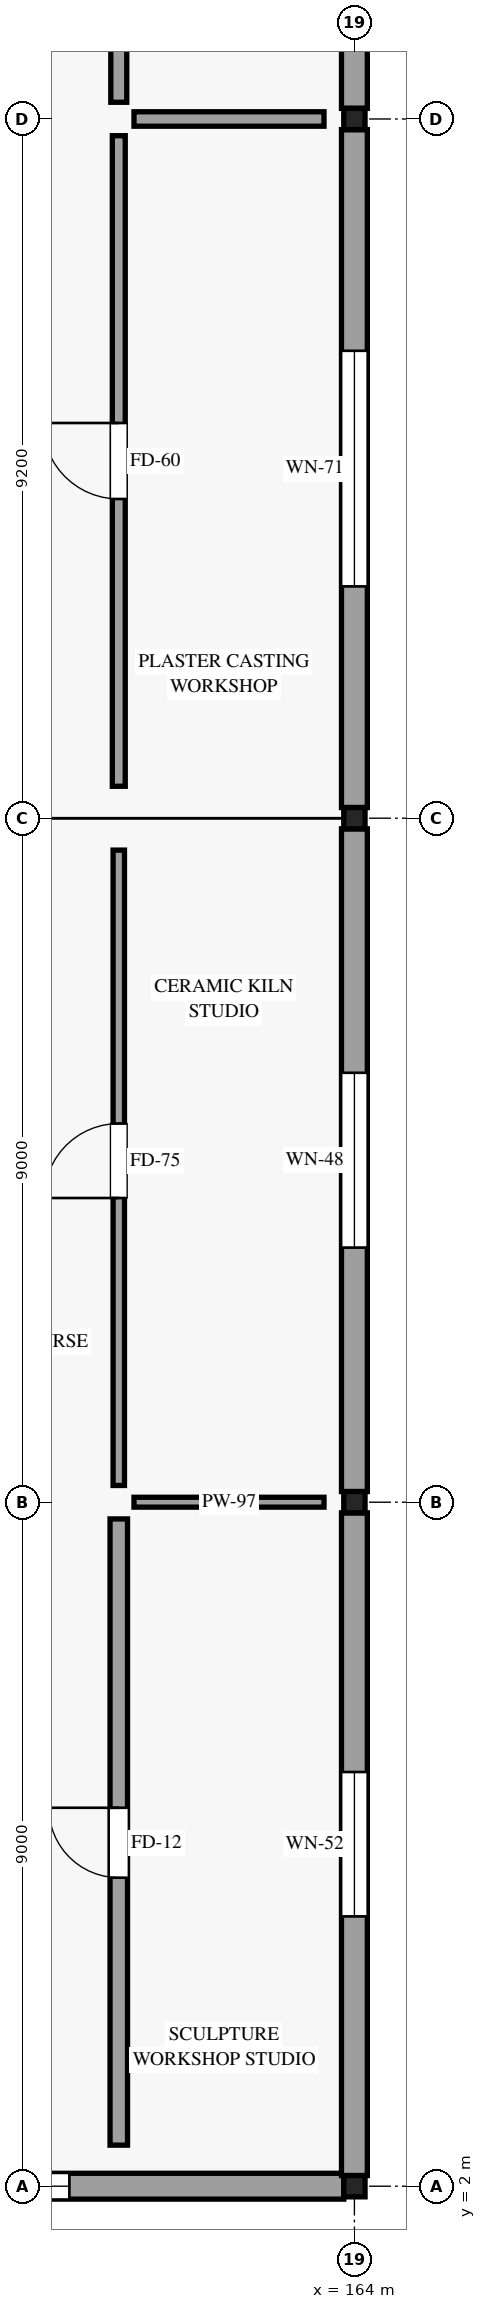
"""IFC4 building model, lengths in metres.
Left out: names, types, materials, properties, quantities, classifications, styles, units other than length and angle.
Written with IfcOpenShell. Run it as: python <this file> out.ifc"""

import sys

from ifc_helpers import new_model, si_unit, direction, frame, frame_2d, origin, origin_2d, place, context, subcontext, project, spatial, rectangle, i_section, extrude, element, fill, save


model = new_model("IFC4")
c1 = context("Model", 3, precision=1e-05, world=origin(), true_north=direction((0.0, 1.0)))
c2 = subcontext(c1, "Body", "Model", "MODEL_VIEW")
j1 = project(units=[si_unit("LENGTHUNIT", "METRE"), si_unit("PLANEANGLEUNIT", "RADIAN")], contexts=[c1])
p1 = place(None, origin())
s1 = spatial("IfcSite", under=j1, at=p1, CompositionType="ELEMENT")
p2 = place(p1, origin())
s2 = spatial("IfcBuilding", under=s1, at=p2, CompositionType="ELEMENT")
p3 = place(p2, frame((0.0, 0.0, 10.2)))
s3 = spatial("IfcBuildingStorey", under=s2, at=p3, CompositionType="ELEMENT", Elevation=10.2)
for number, where, z_axis, x_axis in (
    (1, (164.0, 2.0, 0.0), (0.0, 0.0, 1.0), (1.0, 0.0, 0.0)),
    (2, (164.0, 11.0, 0.0), (0.0, 0.0, 1.0), (1.0, 0.0, 0.0)),
    (3, (164.0, 20.0, 0.0), (0.0, 0.0, 1.0), (1.0, 0.0, 0.0)),
    (4, (164.0, 29.2, 0.0), (0.0, 0.0, 1.0), (1.0, 0.0, 0.0)),
):
    element("IfcColumn", number, at=place(p3, frame(where, z_axis=z_axis, x_axis=x_axis)), inside=s3, PredefinedType="COLUMN", context=c2, shape_type="SweptSolid", body=[
        extrude(i_section(OverallWidth=0.28, OverallDepth=0.28, WebThickness=0.01, FlangeThickness=0.018, FilletRadius=0.024, at=origin_2d()), origin(), (0.0, 0.0, 1.0), 4.8),
    ])
p4 = place(p3, frame((155.14, 2.0, 0.0), z_axis=(0.0, 0.0, 1.0), x_axis=(1.0, 0.0, 0.0)))
e5 = element("IfcWall", 5, at=p4, inside=s3, PredefinedType="STANDARD", context=c2, shape_type="SweptSolid", body=[
    extrude(rectangle(XDim=8.72, YDim=0.34, at=frame_2d((4.36, 0.0))), origin(), (0.0, 0.0, 1.0), 4.115),
])
p5 = place(p4, frame((5.11, 0.0, 0.85), z_axis=(0.0, 0.0, 1.0), x_axis=(-1.0, 0.0, 0.0)))
e6 = element("IfcOpeningElement", 6, at=p5, cuts=e5, PredefinedType="OPENING", context=c2, shape_type="SweptSolid", body=[
    extrude(rectangle(XDim=1.5, YDim=2.2, at=frame_2d((0.75, 1.1))), frame((0.0, 0.18, 0.0), z_axis=(0.0, -1.0, 0.0), x_axis=(1.0, 0.0, 0.0)), (0.0, 0.0, 1.0), 0.36),
])
p6 = place(p3, frame((164.0, 2.14, 0.0), z_axis=(0.0, 0.0, 1.0), x_axis=(0.0, 1.0, 0.0)))
e7 = element("IfcWall", 7, at=p6, inside=s3, PredefinedType="STANDARD", context=c2, shape_type="SweptSolid", body=[
    extrude(rectangle(XDim=8.72, YDim=0.34, at=frame_2d((4.36, 0.0))), origin(), (0.0, 0.0, 1.0), 4.115),
])
p7 = place(p6, frame((5.31, 0.0, 0.85), z_axis=(0.0, 0.0, 1.0), x_axis=(-1.0, 0.0, 0.0)))
e8 = element("IfcOpeningElement", 8, at=p7, cuts=e7, PredefinedType="OPENING", context=c2, shape_type="SweptSolid", body=[
    extrude(rectangle(XDim=1.9, YDim=2.4, at=frame_2d((0.95, 1.2))), frame((0.0, 0.18, 0.0), z_axis=(0.0, -1.0, 0.0), x_axis=(1.0, 0.0, 0.0)), (0.0, 0.0, 1.0), 0.36),
])
p8 = place(p3, frame((164.0, 11.14, 0.0), z_axis=(0.0, 0.0, 1.0), x_axis=(0.0, 1.0, 0.0)))
e9 = element("IfcWall", 9, at=p8, inside=s3, PredefinedType="STANDARD", context=c2, shape_type="SweptSolid", body=[
    extrude(rectangle(XDim=8.72, YDim=0.34, at=frame_2d((4.36, 0.0))), origin(), (0.0, 0.0, 1.0), 4.115),
])
p9 = place(p8, frame((5.51, 0.0, 0.85), z_axis=(0.0, 0.0, 1.0), x_axis=(-1.0, 0.0, 0.0)))
e10 = element("IfcOpeningElement", 10, at=p9, cuts=e9, PredefinedType="OPENING", context=c2, shape_type="SweptSolid", body=[
    extrude(rectangle(XDim=2.3, YDim=2.5, at=frame_2d((1.15, 1.25))), frame((0.0, 0.18, 0.0), z_axis=(0.0, -1.0, 0.0), x_axis=(1.0, 0.0, 0.0)), (0.0, 0.0, 1.0), 0.36),
])
p10 = place(p3, frame((164.0, 20.14, 0.0), z_axis=(0.0, 0.0, 1.0), x_axis=(0.0, 1.0, 0.0)))
e11 = element("IfcWall", 11, at=p10, inside=s3, PredefinedType="STANDARD", context=c2, shape_type="SweptSolid", body=[
    extrude(rectangle(XDim=8.92, YDim=0.34, at=frame_2d((4.46, 0.0))), origin(), (0.0, 0.0, 1.0), 4.115),
])
p11 = place(p10, frame((6.01, 0.0, 0.85), z_axis=(0.0, 0.0, 1.0), x_axis=(-1.0, 0.0, 0.0)))
e12 = element("IfcOpeningElement", 12, at=p11, cuts=e11, PredefinedType="OPENING", context=c2, shape_type="SweptSolid", body=[
    extrude(rectangle(XDim=3.1, YDim=2.3, at=frame_2d((1.55, 1.15))), frame((0.0, 0.18, 0.0), z_axis=(0.0, -1.0, 0.0), x_axis=(1.0, 0.0, 0.0)), (0.0, 0.0, 1.0), 0.36),
])
p12 = place(p3, frame((164.0, 29.34, 0.0), z_axis=(0.0, 0.0, 1.0), x_axis=(0.0, 1.0, 0.0)))
e13 = element("IfcWall", 13, at=p12, inside=s3, PredefinedType="STANDARD", context=c2, shape_type="SweptSolid", body=[
    extrude(rectangle(XDim=8.92, YDim=0.34, at=frame_2d((4.46, 0.0))), origin(), (0.0, 0.0, 1.0), 4.115),
])
p13 = place(p12, frame((5.135, 0.0, 0.85), z_axis=(0.0, 0.0, 1.0), x_axis=(-1.0, 0.0, 0.0)))
e14 = element("IfcOpeningElement", 14, at=p13, cuts=e13, PredefinedType="OPENING", context=c2, shape_type="SweptSolid", body=[
    extrude(rectangle(XDim=1.35, YDim=1.75, at=frame_2d((0.675, 0.875))), frame((0.0, 0.18, 0.0), z_axis=(0.0, -1.0, 0.0), x_axis=(1.0, 0.0, 0.0)), (0.0, 0.0, 1.0), 0.36),
])
p14 = place(p3, frame((160.9, 2.54, 0.0), z_axis=(0.0, 0.0, 1.0), x_axis=(0.0, 1.0, 0.0)))
e15 = element("IfcWall", 15, at=p14, inside=s3, PredefinedType="PARTITIONING", context=c2, shape_type="SweptSolid", body=[
    extrude(rectangle(XDim=8.24, YDim=0.23, at=frame_2d((4.12, 0.0))), origin(), (0.0, 0.0, 1.0), 4.115),
])
p15 = place(p14, frame((3.519, 0.0, 0.0)))
e16 = element("IfcOpeningElement", 16, at=p15, cuts=e15, PredefinedType="OPENING", context=c2, shape_type="SweptSolid", body=[
    extrude(rectangle(XDim=0.92, YDim=2.12, at=frame_2d((0.46, 1.06))), frame((0.0, 0.125, 0.0), z_axis=(0.0, -1.0, 0.0), x_axis=(1.0, 0.0, 0.0)), (0.0, 0.0, 1.0), 0.25),
])
p16 = place(p3, frame((161.1, 11.0, 0.0), z_axis=(0.0, 0.0, 1.0), x_axis=(1.0, 0.0, 0.0)))
e17 = element("IfcWall", 17, at=p16, inside=s3, PredefinedType="PARTITIONING", context=c2, shape_type="SweptSolid", body=[
    extrude(rectangle(XDim=2.5, YDim=0.13, at=frame_2d((1.25, 0.0))), origin(), (0.0, 0.0, 1.0), 4.115),
])
p17 = place(p3, frame((160.9, 11.22, 0.0), z_axis=(0.0, 0.0, 1.0), x_axis=(0.0, 1.0, 0.0)))
e18 = element("IfcWall", 18, at=p17, inside=s3, PredefinedType="PARTITIONING", context=c2, shape_type="SweptSolid", body=[
    extrude(rectangle(XDim=8.36, YDim=0.15, at=frame_2d((4.18, 0.0))), origin(), (0.0, 0.0, 1.0), 4.115),
])
p18 = place(p17, frame((3.782, 0.0, 0.0)))
e19 = element("IfcOpeningElement", 19, at=p18, cuts=e18, PredefinedType="OPENING", context=c2, shape_type="SweptSolid", body=[
    extrude(rectangle(XDim=0.98, YDim=2.18, at=frame_2d((0.49, 1.09))), frame((0.0, 0.085, 0.0), z_axis=(0.0, -1.0, 0.0), x_axis=(1.0, 0.0, 0.0)), (0.0, 0.0, 1.0), 0.17),
])
p19 = place(p3, frame((160.9, 20.42, 0.0), z_axis=(0.0, 0.0, 1.0), x_axis=(0.0, 1.0, 0.0)))
e20 = element("IfcWall", 20, at=p19, inside=s3, PredefinedType="PARTITIONING", context=c2, shape_type="SweptSolid", body=[
    extrude(rectangle(XDim=8.56, YDim=0.17, at=frame_2d((4.28, 0.0))), origin(), (0.0, 0.0, 1.0), 4.115),
])
p20 = place(p19, frame((3.78, 0.0, 0.0)))
e21 = element("IfcOpeningElement", 21, at=p20, cuts=e20, PredefinedType="OPENING", context=c2, shape_type="SweptSolid", body=[
    extrude(rectangle(XDim=1.0, YDim=2.2, at=frame_2d((0.5, 1.1))), frame((0.0, 0.095, 0.0), z_axis=(0.0, -1.0, 0.0), x_axis=(1.0, 0.0, 0.0)), (0.0, 0.0, 1.0), 0.19),
])
p21 = place(p3, frame((161.1, 29.2, 0.0), z_axis=(0.0, 0.0, 1.0), x_axis=(1.0, 0.0, 0.0)))
e22 = element("IfcWall", 22, at=p21, inside=s3, PredefinedType="PARTITIONING", context=c2, shape_type="SweptSolid", body=[
    extrude(rectangle(XDim=2.5, YDim=0.19, at=frame_2d((1.25, 0.0))), origin(), (0.0, 0.0, 1.0), 4.115),
])
p22 = place(p3, frame((160.9, 29.42, 0.0), z_axis=(0.0, 0.0, 1.0), x_axis=(0.0, 1.0, 0.0)))
e23 = element("IfcWall", 23, at=p22, inside=s3, PredefinedType="PARTITIONING", context=c2, shape_type="SweptSolid", body=[
    extrude(rectangle(XDim=17.64, YDim=0.21, at=frame_2d((8.82, 0.0))), origin(), (0.0, 0.0, 1.0), 4.115),
])
p23 = place(p22, frame((3.909, 0.0, 0.0)))
e24 = element("IfcOpeningElement", 24, at=p23, cuts=e23, PredefinedType="OPENING", context=c2, shape_type="SweptSolid", body=[
    extrude(rectangle(XDim=1.08, YDim=2.24, at=frame_2d((0.54, 1.12))), frame((0.0, 0.115, 0.0), z_axis=(0.0, -1.0, 0.0), x_axis=(1.0, 0.0, 0.0)), (0.0, 0.0, 1.0), 0.23),
])
p24 = place(p5, origin())
e25 = element("IfcWindow", 25, at=p24, inside=s3, PartitioningType="SINGLE_PANEL", PredefinedType="WINDOW", context=c2, shape_type="SweptSolid", body=[
    extrude(rectangle(XDim=1.5, YDim=2.2, at=frame_2d((0.75, 1.1))), frame((0.0, 0.03, 0.0), z_axis=(0.0, -1.0, 0.0), x_axis=(1.0, 0.0, 0.0)), (0.0, 0.0, 1.0), 0.06),
])
fill(e6, e25)
p25 = place(p7, origin())
e26 = element("IfcWindow", 26, at=p25, inside=s3, PartitioningType="SINGLE_PANEL", PredefinedType="WINDOW", context=c2, shape_type="SweptSolid", body=[
    extrude(rectangle(XDim=1.9, YDim=2.4, at=frame_2d((0.95, 1.2))), frame((0.0, 0.03, 0.0), z_axis=(0.0, -1.0, 0.0), x_axis=(1.0, 0.0, 0.0)), (0.0, 0.0, 1.0), 0.06),
])
fill(e8, e26)
p26 = place(p9, origin())
e27 = element("IfcWindow", 27, at=p26, inside=s3, PartitioningType="SINGLE_PANEL", PredefinedType="WINDOW", context=c2, shape_type="SweptSolid", body=[
    extrude(rectangle(XDim=2.3, YDim=2.5, at=frame_2d((1.15, 1.25))), frame((0.0, 0.03, 0.0), z_axis=(0.0, -1.0, 0.0), x_axis=(1.0, 0.0, 0.0)), (0.0, 0.0, 1.0), 0.06),
])
fill(e10, e27)
p27 = place(p11, origin())
e28 = element("IfcWindow", 28, at=p27, inside=s3, PartitioningType="SINGLE_PANEL", PredefinedType="WINDOW", context=c2, shape_type="SweptSolid", body=[
    extrude(rectangle(XDim=3.1, YDim=2.3, at=frame_2d((1.55, 1.15))), frame((0.0, 0.03, 0.0), z_axis=(0.0, -1.0, 0.0), x_axis=(1.0, 0.0, 0.0)), (0.0, 0.0, 1.0), 0.06),
])
fill(e12, e28)
p28 = place(p15, origin())
e29 = element("IfcDoor", 29, at=p28, inside=s3, OperationType="SINGLE_SWING_RIGHT", PredefinedType="DOOR", context=c2, shape_type="SweptSolid", body=[
    extrude(rectangle(XDim=0.92, YDim=2.12, at=frame_2d((0.46, 1.06))), frame((0.0, 0.025, 0.0), z_axis=(0.0, -1.0, 0.0), x_axis=(1.0, 0.0, 0.0)), (0.0, 0.0, 1.0), 0.05),
])
fill(e16, e29)
p29 = place(p18, origin())
e30 = element("IfcDoor", 30, at=p29, inside=s3, OperationType="SINGLE_SWING_LEFT", PredefinedType="DOOR", context=c2, shape_type="SweptSolid", body=[
    extrude(rectangle(XDim=0.98, YDim=2.18, at=frame_2d((0.49, 1.09))), frame((0.0, 0.025, 0.0), z_axis=(0.0, -1.0, 0.0), x_axis=(1.0, 0.0, 0.0)), (0.0, 0.0, 1.0), 0.05),
])
fill(e19, e30)
p30 = place(p20, origin())
e31 = element("IfcDoor", 31, at=p30, inside=s3, OperationType="SINGLE_SWING_RIGHT", PredefinedType="DOOR", context=c2, shape_type="SweptSolid", body=[
    extrude(rectangle(XDim=1.0, YDim=2.2, at=frame_2d((0.5, 1.1))), frame((0.0, 0.025, 0.0), z_axis=(0.0, -1.0, 0.0), x_axis=(1.0, 0.0, 0.0)), (0.0, 0.0, 1.0), 0.05),
])
fill(e21, e31)
save(model, sys.argv[1])
